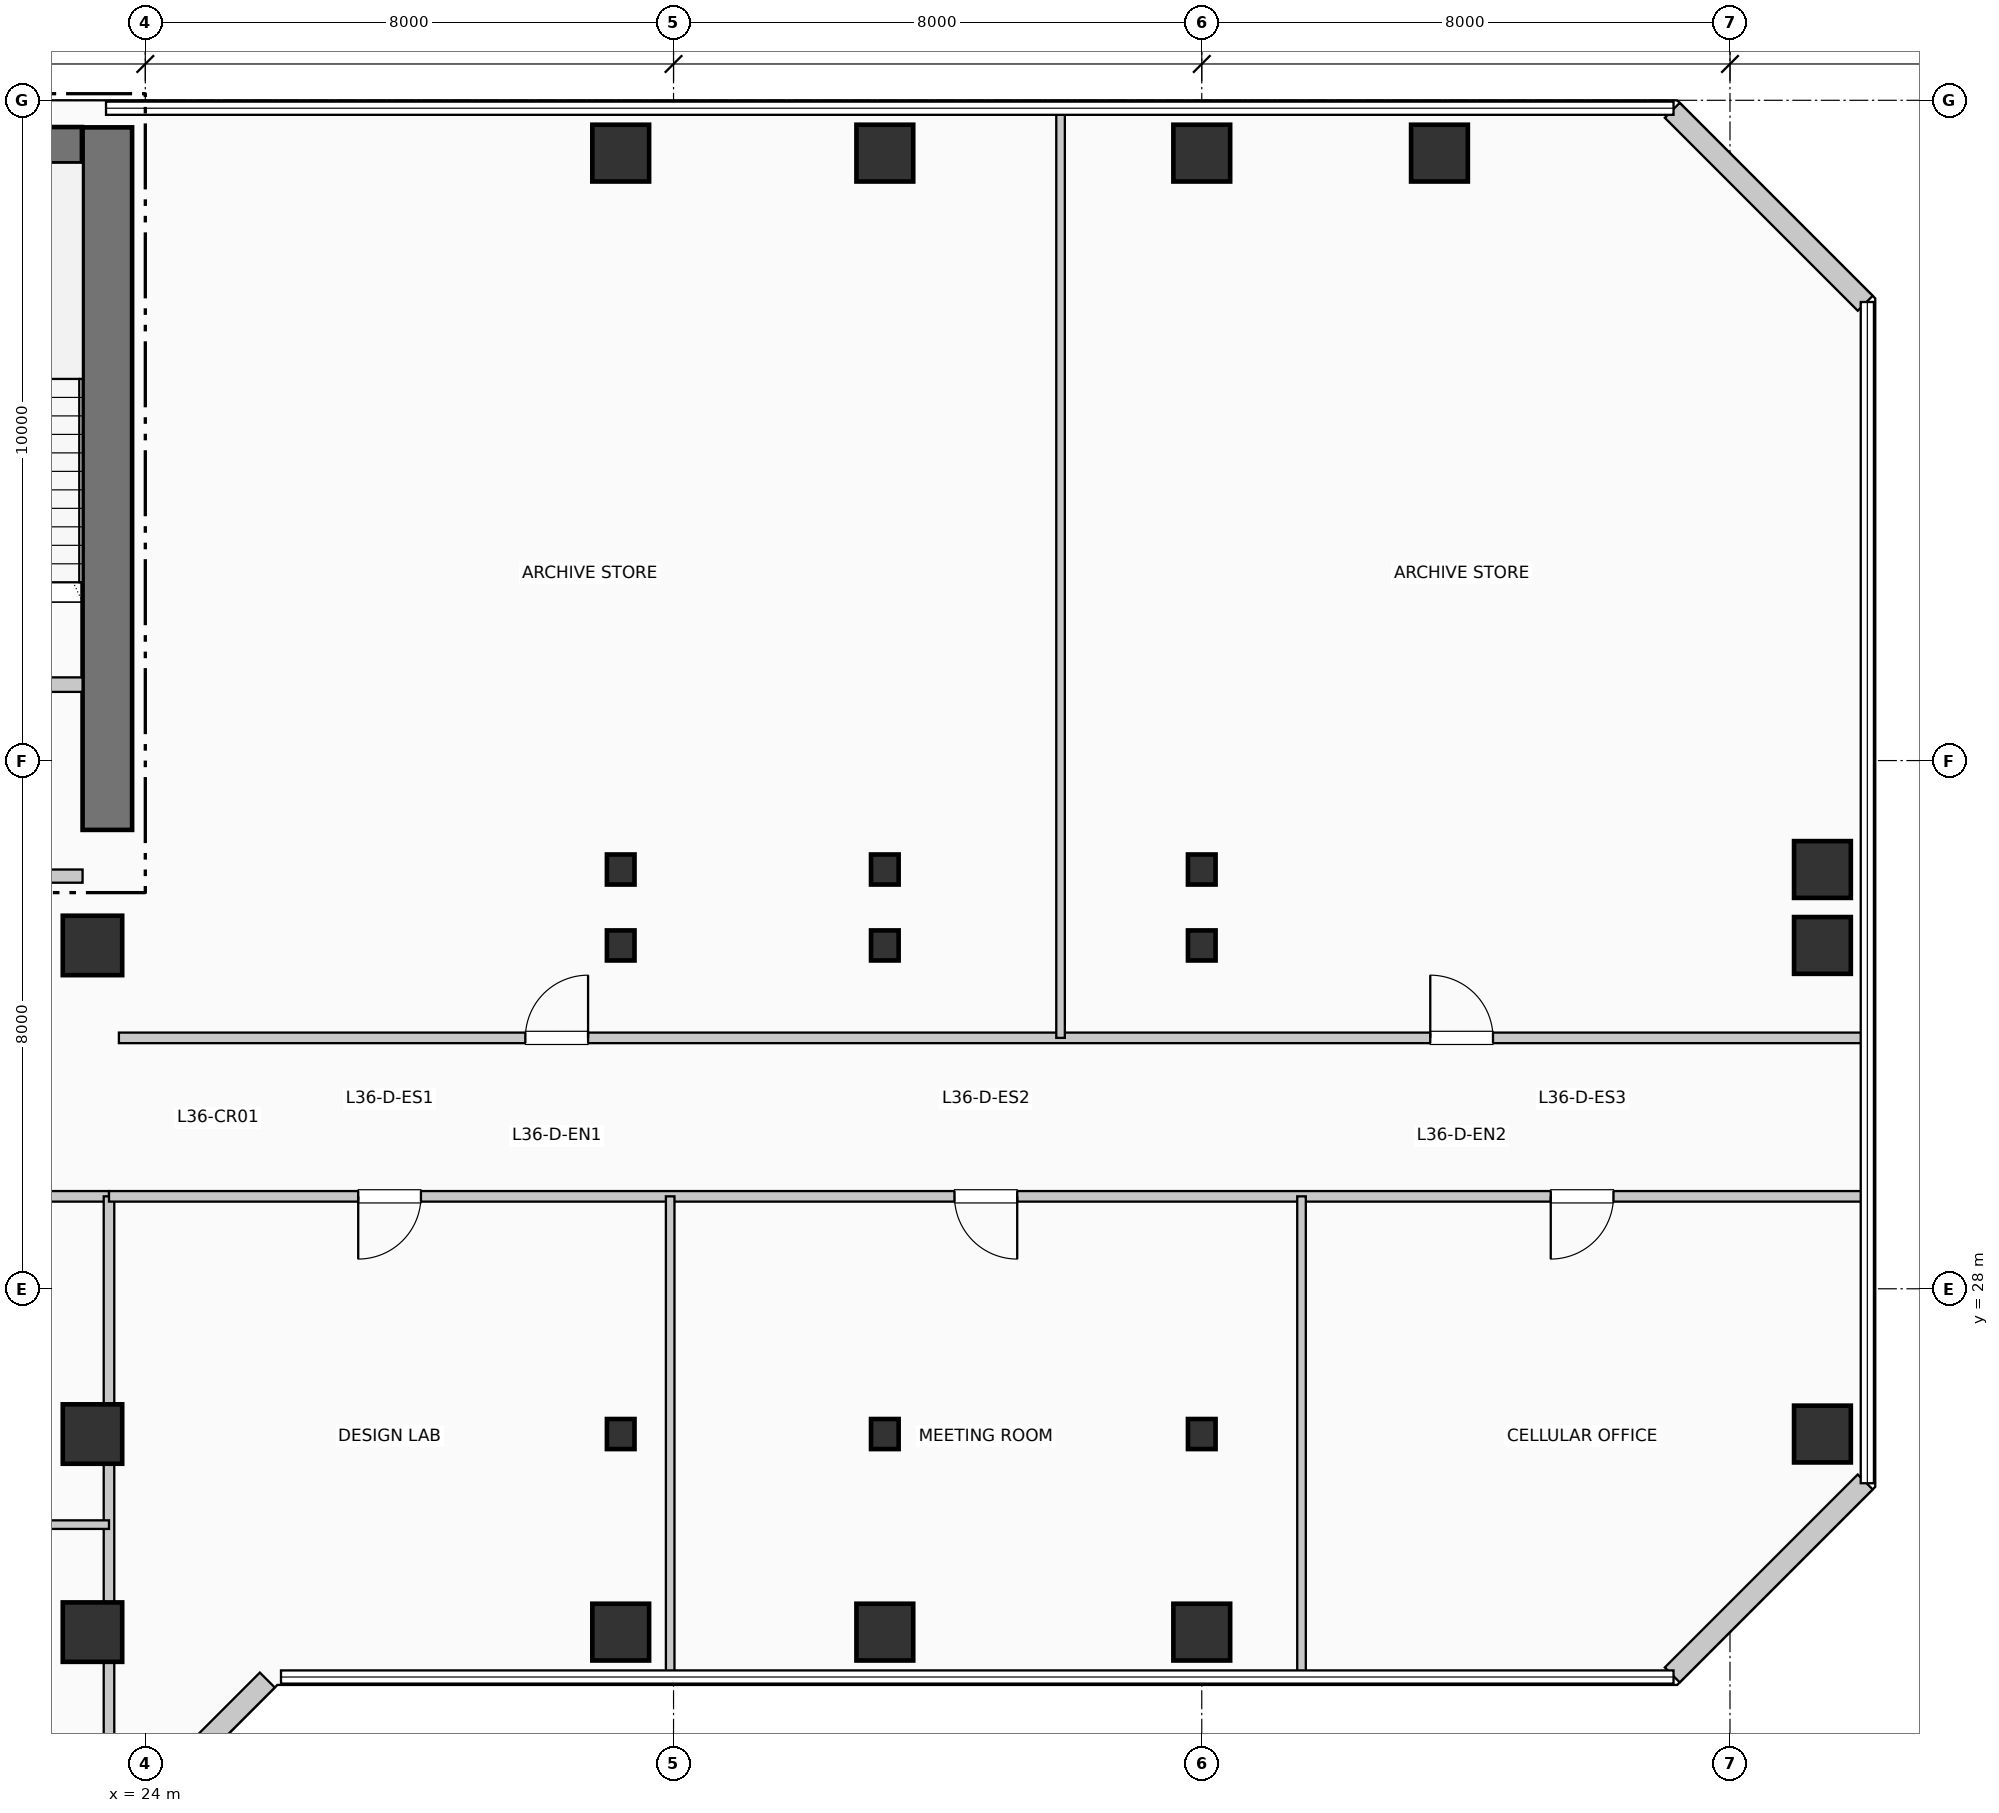
"""IFC4 building model, lengths in metres.
Left out: names, types, materials, properties, quantities, classifications, styles, units other than length and angle.
Written with IfcOpenShell. Run it as: python <this file> out.ifc"""

import sys

from ifc_helpers import new_model, si_unit, direction, frame, frame_2d, origin, origin_2d, place, context, subcontext, project, spatial, rectangle, i_section, extrude, element, fill, save


model = new_model("IFC4")
c1 = context("Model", 3, precision=1e-05, world=origin(), true_north=direction((0.0, 1.0)))
c2 = subcontext(c1, "Body", "Model", "MODEL_VIEW")
j1 = project(units=[si_unit("LENGTHUNIT", "METRE"), si_unit("PLANEANGLEUNIT", "RADIAN")], contexts=[c1])
p1 = place(None, origin())
s1 = spatial("IfcSite", under=j1, at=p1, CompositionType="ELEMENT")
p2 = place(p1, origin())
s2 = spatial("IfcBuilding", under=s1, at=p2, CompositionType="ELEMENT")
p3 = place(p2, frame((0.0, 0.0, 150.81)))
s3 = spatial("IfcBuildingStorey", under=s2, at=p3, CompositionType="ELEMENT", Elevation=150.81)
p4 = place(p3, frame((23.425, 34.95, 0.0), z_axis=(0.0, 0.0, 1.0), x_axis=(0.0, 1.0, 0.0)))
e1 = element("IfcWall", 1, at=p4, inside=s3, PredefinedType="SHEAR", context=c2, shape_type="SweptSolid", body=[
    extrude(rectangle(XDim=10.64, YDim=0.75, at=frame_2d((5.32, 0.0))), origin(), (0.0, 0.0, 1.0), 3.96),
])
p5 = place(p3, frame((19.35, 45.32, 0.0), z_axis=(0.0, 0.0, 1.0), x_axis=(1.0, 0.0, 0.0)))
e2 = element("IfcWall", 2, at=p5, inside=s3, PredefinedType="SHEAR", context=c2, shape_type="SweptSolid", body=[
    extrude(rectangle(XDim=3.69, YDim=0.55, at=frame_2d((1.845, 0.0))), origin(), (0.0, 0.0, 1.0), 3.96),
])
p6 = place(p5, frame((1.15, 0.0, 1.05)))
e3 = element("IfcOpeningElement", 3, at=p6, cuts=e2, PredefinedType="OPENING", context=c2, shape_type="SweptSolid", body=[
    extrude(rectangle(XDim=1.4, YDim=1.8, at=frame_2d((0.7, 0.9))), frame((0.0, 0.285, 0.0), z_axis=(0.0, -1.0, 0.0), x_axis=(1.0, 0.0, 0.0)), (0.0, 0.0, 1.0), 0.57),
])
for number, where, z_axis, x_axis in (
    (4, (23.2, 22.8, 0.0), (0.0, 0.0, 1.0), (1.0, 0.0, 0.0)),
    (5, (23.2, 25.8, 0.0), (0.0, 0.0, 1.0), (1.0, 0.0, 0.0)),
    (6, (23.2, 33.2, 0.0), (0.0, 0.0, 1.0), (1.0, 0.0, 0.0)),
):
    element("IfcColumn", number, at=place(p3, frame(where, z_axis=z_axis, x_axis=x_axis)), inside=s3, PredefinedType="COLUMN", context=c2, shape_type="SweptSolid", body=[
        extrude(rectangle(XDim=0.9, YDim=0.9, at=origin_2d()), origin(), (0.0, 0.0, 1.0), 3.96),
    ])
p7 = place(p3, frame((31.2, 22.8, 0.0), z_axis=(0.0, 0.0, 1.0), x_axis=(1.0, 0.0, 0.0)))
e7 = element("IfcColumn", 7, at=p7, inside=s3, PredefinedType="COLUMN", context=c2, shape_type="SweptSolid", body=[
    extrude(rectangle(XDim=0.86, YDim=0.86, at=origin_2d()), origin(), (0.0, 0.0, 1.0), 3.96),
])
for number, where, z_axis, x_axis in (
    (8, (31.2, 25.8, 0.0), (0.0, 0.0, 1.0), (1.0, 0.0, 0.0)),
    (9, (31.2, 33.2, 0.0), (0.0, 0.0, 1.0), (1.0, 0.0, 0.0)),
    (10, (31.2, 34.35, 0.0), (0.0, 0.0, 1.0), (1.0, 0.0, 0.0)),
):
    element("IfcColumn", number, at=place(p3, frame(where, z_axis=z_axis, x_axis=x_axis)), inside=s3, PredefinedType="COLUMN", context=c2, shape_type="SweptSolid", body=[
        extrude(i_section(OverallWidth=0.418, OverallDepth=0.455, WebThickness=0.032, FlangeThickness=0.051, at=origin_2d()), origin(), (0.0, 0.0, 1.0), 3.96),
    ])
for number, where, z_axis, x_axis in (
    (11, (31.2, 45.2, 0.0), (0.0, 0.0, 1.0), (1.0, 0.0, 0.0)),
    (12, (35.2, 22.8, 0.0), (0.0, 0.0, 1.0), (1.0, 0.0, 0.0)),
):
    element("IfcColumn", number, at=place(p3, frame(where, z_axis=z_axis, x_axis=x_axis)), inside=s3, PredefinedType="COLUMN", context=c2, shape_type="SweptSolid", body=[
        extrude(rectangle(XDim=0.86, YDim=0.86, at=origin_2d()), origin(), (0.0, 0.0, 1.0), 3.96),
    ])
for number, where, z_axis, x_axis in (
    (13, (35.2, 25.8, 0.0), (0.0, 0.0, 1.0), (1.0, 0.0, 0.0)),
    (14, (35.2, 33.2, 0.0), (0.0, 0.0, 1.0), (1.0, 0.0, 0.0)),
    (15, (35.2, 34.35, 0.0), (0.0, 0.0, 1.0), (1.0, 0.0, 0.0)),
):
    element("IfcColumn", number, at=place(p3, frame(where, z_axis=z_axis, x_axis=x_axis)), inside=s3, PredefinedType="COLUMN", context=c2, shape_type="SweptSolid", body=[
        extrude(i_section(OverallWidth=0.418, OverallDepth=0.455, WebThickness=0.032, FlangeThickness=0.051, at=origin_2d()), origin(), (0.0, 0.0, 1.0), 3.96),
    ])
for number, where, z_axis, x_axis in (
    (16, (35.2, 45.2, 0.0), (0.0, 0.0, 1.0), (1.0, 0.0, 0.0)),
    (17, (40.0, 22.8, 0.0), (0.0, 0.0, 1.0), (1.0, 0.0, 0.0)),
):
    element("IfcColumn", number, at=place(p3, frame(where, z_axis=z_axis, x_axis=x_axis)), inside=s3, PredefinedType="COLUMN", context=c2, shape_type="SweptSolid", body=[
        extrude(rectangle(XDim=0.86, YDim=0.86, at=origin_2d()), origin(), (0.0, 0.0, 1.0), 3.96),
    ])
for number, where, z_axis, x_axis in (
    (18, (40.0, 25.8, 0.0), (0.0, 0.0, 1.0), (1.0, 0.0, 0.0)),
    (19, (40.0, 33.2, 0.0), (0.0, 0.0, 1.0), (1.0, 0.0, 0.0)),
    (20, (40.0, 34.35, 0.0), (0.0, 0.0, 1.0), (1.0, 0.0, 0.0)),
):
    element("IfcColumn", number, at=place(p3, frame(where, z_axis=z_axis, x_axis=x_axis)), inside=s3, PredefinedType="COLUMN", context=c2, shape_type="SweptSolid", body=[
        extrude(i_section(OverallWidth=0.418, OverallDepth=0.455, WebThickness=0.032, FlangeThickness=0.051, at=origin_2d()), origin(), (0.0, 0.0, 1.0), 3.96),
    ])
for number, where, z_axis, x_axis in (
    (21, (40.0, 45.2, 0.0), (0.0, 0.0, 1.0), (1.0, 0.0, 0.0)),
    (22, (43.6, 45.2, 0.0), (0.0, 0.0, 1.0), (1.0, 0.0, 0.0)),
    (23, (49.4, 25.8, 0.0), (0.0, 0.0, 1.0), (1.0, 0.0, 0.0)),
    (24, (49.4, 33.2, 0.0), (0.0, 0.0, 1.0), (1.0, 0.0, 0.0)),
    (25, (49.4, 34.35, 0.0), (0.0, 0.0, 1.0), (1.0, 0.0, 0.0)),
):
    element("IfcColumn", number, at=place(p3, frame(where, z_axis=z_axis, x_axis=x_axis)), inside=s3, PredefinedType="COLUMN", context=c2, shape_type="SweptSolid", body=[
        extrude(rectangle(XDim=0.86, YDim=0.86, at=origin_2d()), origin(), (0.0, 0.0, 1.0), 3.96),
    ])
p8 = place(p3, frame((23.926, 20.152, 0.0), z_axis=(0.0, 0.0, 1.0), x_axis=(0.707106781187, 0.707106781187, 0.0)))
e26 = element("IfcWall", 26, at=p8, inside=s3, PredefinedType="SOLIDWALL", context=c2, shape_type="SweptSolid", body=[
    extrude(rectangle(XDim=2.718, YDim=0.32, at=frame_2d((1.359, 0.0))), origin(), (0.0, 0.0, 1.0), 3.71),
])
for number, where, z_axis, x_axis in (
    (27, (47.126, 22.152, 0.0), (0.0, 0.0, 1.0), (0.707, 0.707, 0.0)),
    (28, (50.048, 42.926, 0.0), (0.0, 0.0, 1.0), (-0.707, 0.707, 0.0)),
):
    element("IfcWall", number, at=place(p3, frame(where, z_axis=z_axis, x_axis=x_axis)), inside=s3, PredefinedType="SOLIDWALL", context=c2, shape_type="SweptSolid", body=[
        extrude(rectangle(XDim=4.133, YDim=0.32, at=frame_2d((2.066, 0.0))), origin(), (0.0, 0.0, 1.0), 3.71),
    ])
p9 = place(p3, frame((19.9, 37.15, 0.0), z_axis=(0.0, 0.0, 1.0), x_axis=(1.0, 0.0, 0.0)))
e29 = element("IfcWall", 29, at=p9, inside=s3, PredefinedType="PARTITIONING", context=c2, shape_type="SweptSolid", body=[
    extrude(rectangle(XDim=3.15, YDim=0.22, at=frame_2d((1.575, 0.0))), origin(), (0.0, 0.0, 1.0), 3.71),
])
p10 = place(p9, frame((2.05, 0.0, 0.0), z_axis=(0.0, 0.0, 1.0), x_axis=(-1.0, 0.0, 0.0)))
e30 = element("IfcOpeningElement", 30, at=p10, cuts=e29, PredefinedType="OPENING", context=c2, shape_type="SweptSolid", body=[
    extrude(rectangle(XDim=1.05, YDim=2.15, at=frame_2d((0.525, 1.075))), frame((0.0, 0.12, 0.0), z_axis=(0.0, -1.0, 0.0), x_axis=(1.0, 0.0, 0.0)), (0.0, 0.0, 1.0), 0.24),
])
p11 = place(p3, frame((19.8, 34.25, 0.0), z_axis=(0.0, 0.0, 1.0), x_axis=(1.0, 0.0, 0.0)))
e31 = element("IfcWall", 31, at=p11, inside=s3, PredefinedType="PARTITIONING", context=c2, shape_type="SweptSolid", body=[
    extrude(rectangle(XDim=3.25, YDim=0.2, at=frame_2d((1.625, 0.0))), origin(), (0.0, 0.0, 1.0), 3.71),
])
p12 = place(p11, frame((2.15, 0.0, 0.0), z_axis=(0.0, 0.0, 1.0), x_axis=(-1.0, 0.0, 0.0)))
e32 = element("IfcOpeningElement", 32, at=p12, cuts=e31, PredefinedType="OPENING", context=c2, shape_type="SweptSolid", body=[
    extrude(rectangle(XDim=1.1, YDim=2.15, at=frame_2d((0.55, 1.075))), frame((0.0, 0.11, 0.0), z_axis=(0.0, -1.0, 0.0), x_axis=(1.0, 0.0, 0.0)), (0.0, 0.0, 1.0), 0.22),
])
p13 = place(p3, frame((9.04, 29.4, 0.0), z_axis=(0.0, 0.0, 1.0), x_axis=(1.0, 0.0, 0.0)))
e33 = element("IfcWall", 33, at=p13, inside=s3, PredefinedType="PARTITIONING", context=c2, shape_type="SweptSolid", body=[
    extrude(rectangle(XDim=14.41, YDim=0.16, at=frame_2d((7.205, 0.0))), origin(), (0.0, 0.0, 1.0), 3.365),
])
p14 = place(p3, frame((23.45, 0.19, 0.0), z_axis=(0.0, 0.0, 1.0), x_axis=(0.0, 1.0, 0.0)))
e34 = element("IfcWall", 34, at=p14, inside=s3, PredefinedType="PARTITIONING", context=c2, shape_type="SweptSolid", body=[
    extrude(rectangle(XDim=29.21, YDim=0.16, at=frame_2d((14.605, 0.0))), origin(), (0.0, 0.0, 1.0), 3.045),
])
p15 = place(p3, frame((9.04, 24.428, 0.0), z_axis=(0.0, 0.0, 1.0), x_axis=(1.0, 0.0, 0.0)))
e35 = element("IfcWall", 35, at=p15, inside=s3, PredefinedType="PARTITIONING", context=c2, shape_type="SweptSolid", body=[
    extrude(rectangle(XDim=14.41, YDim=0.13, at=frame_2d((7.205, 0.0))), origin(), (0.0, 0.0, 1.0), 3.71),
])
p16 = place(p3, frame((23.45, 29.4, 0.0), z_axis=(0.0, 0.0, 1.0), x_axis=(1.0, 0.0, 0.0)))
e36 = element("IfcWall", 36, at=p16, inside=s3, PredefinedType="PARTITIONING", context=c2, shape_type="SweptSolid", body=[
    extrude(rectangle(XDim=26.56, YDim=0.16, at=frame_2d((13.28, 0.0))), origin(), (0.0, 0.0, 1.0), 3.365),
])
p17 = place(p16, frame((4.725, 0.0, 0.0), z_axis=(0.0, 0.0, 1.0), x_axis=(-1.0, 0.0, 0.0)))
e37 = element("IfcOpeningElement", 37, at=p17, cuts=e36, PredefinedType="OPENING", context=c2, shape_type="SweptSolid", body=[
    extrude(rectangle(XDim=0.95, YDim=2.15, at=frame_2d((0.475, 1.075))), frame((0.0, 0.09, 0.0), z_axis=(0.0, -1.0, 0.0), x_axis=(1.0, 0.0, 0.0)), (0.0, 0.0, 1.0), 0.18),
])
p18 = place(p16, frame((13.755, 0.0, 0.0), z_axis=(0.0, 0.0, 1.0), x_axis=(-1.0, 0.0, 0.0)))
e38 = element("IfcOpeningElement", 38, at=p18, cuts=e36, PredefinedType="OPENING", context=c2, shape_type="SweptSolid", body=[
    extrude(rectangle(XDim=0.95, YDim=2.15, at=frame_2d((0.475, 1.075))), frame((0.0, 0.09, 0.0), z_axis=(0.0, -1.0, 0.0), x_axis=(1.0, 0.0, 0.0)), (0.0, 0.0, 1.0), 0.18),
])
p19 = place(p16, frame((22.785, 0.0, 0.0), z_axis=(0.0, 0.0, 1.0), x_axis=(-1.0, 0.0, 0.0)))
e39 = element("IfcOpeningElement", 39, at=p19, cuts=e36, PredefinedType="OPENING", context=c2, shape_type="SweptSolid", body=[
    extrude(rectangle(XDim=0.95, YDim=2.15, at=frame_2d((0.475, 1.075))), frame((0.0, 0.09, 0.0), z_axis=(0.0, -1.0, 0.0), x_axis=(1.0, 0.0, 0.0)), (0.0, 0.0, 1.0), 0.18),
])
p20 = place(p3, frame((23.6, 31.8, 0.0), z_axis=(0.0, 0.0, 1.0), x_axis=(1.0, 0.0, 0.0)))
e40 = element("IfcWall", 40, at=p20, inside=s3, PredefinedType="PARTITIONING", context=c2, shape_type="SweptSolid", body=[
    extrude(rectangle(XDim=26.41, YDim=0.16, at=frame_2d((13.205, 0.0))), origin(), (0.0, 0.0, 1.0), 3.71),
])
p21 = place(p20, frame((6.156, 0.0, 0.0)))
e41 = element("IfcOpeningElement", 41, at=p21, cuts=e40, PredefinedType="OPENING", context=c2, shape_type="SweptSolid", body=[
    extrude(rectangle(XDim=0.95, YDim=2.15, at=frame_2d((0.475, 1.075))), frame((0.0, 0.09, 0.0), z_axis=(0.0, -1.0, 0.0), x_axis=(1.0, 0.0, 0.0)), (0.0, 0.0, 1.0), 0.18),
])
p22 = place(p20, frame((19.861, 0.0, 0.0)))
e42 = element("IfcOpeningElement", 42, at=p22, cuts=e40, PredefinedType="OPENING", context=c2, shape_type="SweptSolid", body=[
    extrude(rectangle(XDim=0.95, YDim=2.15, at=frame_2d((0.475, 1.075))), frame((0.0, 0.09, 0.0), z_axis=(0.0, -1.0, 0.0), x_axis=(1.0, 0.0, 0.0)), (0.0, 0.0, 1.0), 0.18),
])
for number, where, z_axis, x_axis in (
    (43, (31.949, 22.19, 0.0), (0.0, 0.0, 1.0), (0.0, 1.0, 0.0)),
    (44, (41.511, 22.19, 0.0), (0.0, 0.0, 1.0), (0.0, 1.0, 0.0)),
):
    element("IfcWall", number, at=place(p3, frame(where, z_axis=z_axis, x_axis=x_axis)), inside=s3, PredefinedType="PARTITIONING", context=c2, shape_type="SweptSolid", body=[
        extrude(rectangle(XDim=7.21, YDim=0.13, at=frame_2d((3.605, 0.0))), origin(), (0.0, 0.0, 1.0), 3.71),
    ])
p23 = place(p3, frame((37.861, 31.8, 0.0), z_axis=(0.0, 0.0, 1.0), x_axis=(0.0, 1.0, 0.0)))
e45 = element("IfcWall", 45, at=p23, inside=s3, PredefinedType="PARTITIONING", context=c2, shape_type="SweptSolid", body=[
    extrude(rectangle(XDim=14.01, YDim=0.13, at=frame_2d((7.005, 0.0))), origin(), (0.0, 0.0, 1.0), 3.71),
])
p24 = place(p17, origin())
e46 = element("IfcDoor", 46, at=p24, inside=s3, OperationType="SINGLE_SWING_LEFT", PredefinedType="DOOR", context=c2, shape_type="SweptSolid", body=[
    extrude(rectangle(XDim=0.95, YDim=2.15, at=frame_2d((0.475, 1.075))), frame((0.0, 0.025, 0.0), z_axis=(0.0, -1.0, 0.0), x_axis=(1.0, 0.0, 0.0)), (0.0, 0.0, 1.0), 0.05),
])
fill(e37, e46)
p25 = place(p18, origin())
e47 = element("IfcDoor", 47, at=p25, inside=s3, OperationType="SINGLE_SWING_RIGHT", PredefinedType="DOOR", context=c2, shape_type="SweptSolid", body=[
    extrude(rectangle(XDim=0.95, YDim=2.15, at=frame_2d((0.475, 1.075))), frame((0.0, 0.025, 0.0), z_axis=(0.0, -1.0, 0.0), x_axis=(1.0, 0.0, 0.0)), (0.0, 0.0, 1.0), 0.05),
])
fill(e38, e47)
p26 = place(p19, origin())
e48 = element("IfcDoor", 48, at=p26, inside=s3, OperationType="SINGLE_SWING_LEFT", PredefinedType="DOOR", context=c2, shape_type="SweptSolid", body=[
    extrude(rectangle(XDim=0.95, YDim=2.15, at=frame_2d((0.475, 1.075))), frame((0.0, 0.025, 0.0), z_axis=(0.0, -1.0, 0.0), x_axis=(1.0, 0.0, 0.0)), (0.0, 0.0, 1.0), 0.05),
])
fill(e39, e48)
p27 = place(p21, origin())
e49 = element("IfcDoor", 49, at=p27, inside=s3, OperationType="SINGLE_SWING_RIGHT", PredefinedType="DOOR", context=c2, shape_type="SweptSolid", body=[
    extrude(rectangle(XDim=0.95, YDim=2.15, at=frame_2d((0.475, 1.075))), frame((0.0, 0.025, 0.0), z_axis=(0.0, -1.0, 0.0), x_axis=(1.0, 0.0, 0.0)), (0.0, 0.0, 1.0), 0.05),
])
fill(e41, e49)
p28 = place(p22, origin())
e50 = element("IfcDoor", 50, at=p28, inside=s3, OperationType="SINGLE_SWING_LEFT", PredefinedType="DOOR", context=c2, shape_type="SweptSolid", body=[
    extrude(rectangle(XDim=0.95, YDim=2.15, at=frame_2d((0.475, 1.075))), frame((0.0, 0.025, 0.0), z_axis=(0.0, -1.0, 0.0), x_axis=(1.0, 0.0, 0.0)), (0.0, 0.0, 1.0), 0.05),
])
fill(e42, e50)
save(model, sys.argv[1])
